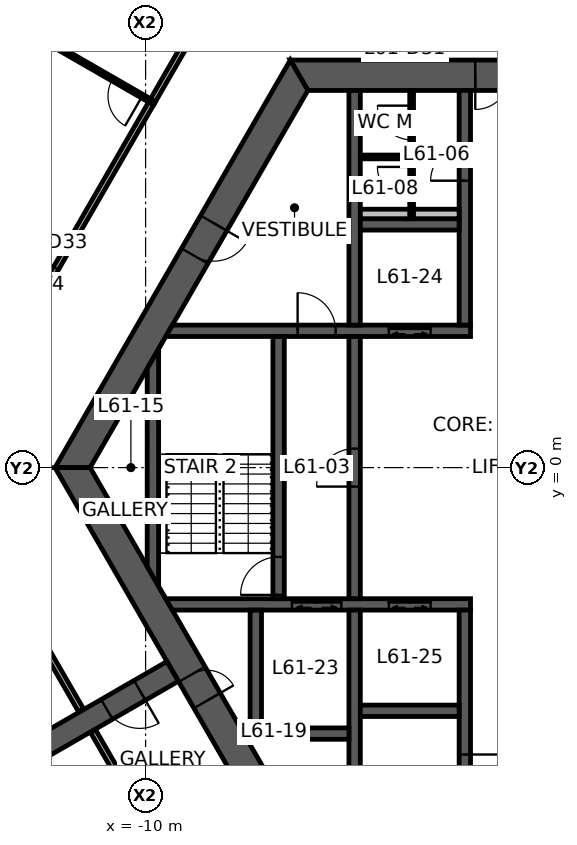
"""IFC4 building model, lengths in metres.
Left out: names, types, materials, properties, quantities, classifications, styles, units other than length and angle.
Written with IfcOpenShell. Run it as: python <this file> out.ifc"""

import sys

from ifc_helpers import new_model, si_unit, direction, frame, frame_2d, origin, place, context, subcontext, project, spatial, polyline, rectangle, outline, extrude, element, fill, save


model = new_model("IFC4")
c1 = context("Model", 3, precision=1e-05, world=origin(), true_north=direction((0.0, 1.0)))
c2 = subcontext(c1, "Body", "Model", "MODEL_VIEW")
j1 = project(units=[si_unit("LENGTHUNIT", "METRE"), si_unit("PLANEANGLEUNIT", "RADIAN")], contexts=[c1])
p1 = place(None, origin())
s1 = spatial("IfcSite", under=j1, at=p1, CompositionType="ELEMENT")
p2 = place(p1, origin())
s2 = spatial("IfcBuilding", under=s1, at=p2, CompositionType="ELEMENT")
p3 = place(p2, frame((0.0, 0.0, 244.0)))
s3 = spatial("IfcBuildingStorey", under=s2, at=p3, CompositionType="ELEMENT", Elevation=244.0)
p4 = place(p3, frame((5.961, 10.325, 0.0), z_axis=(0.0, 0.0, 1.0), x_axis=(-1.0, 0.0, 0.0)))
e1 = element("IfcWall", 1, at=p4, inside=s3, PredefinedType="SHEAR", context=c2, shape_type="SweptSolid", body=[
    extrude(outline(polyline([(-0.231, -0.4), (4.636, -0.4), (5.536, -0.4), (6.386, -0.4), (7.286, -0.4), (12.153, -0.4), (11.691, 0.4), (7.286, 0.4), (6.386, 0.4), (5.536, 0.4), (4.636, 0.4), (0.231, 0.4), (-0.231, -0.4)])), origin(), (0.0, 0.0, 1.0), 3.9),
])
p5 = place(p4, frame((6.386, 0.0, 0.0)))
e2 = element("IfcOpeningElement", 2, at=p5, cuts=e1, PredefinedType="OPENING", context=c2, shape_type="SweptSolid", body=[
    extrude(rectangle(XDim=0.9, YDim=2.1, at=frame_2d((0.45, 1.05))), frame((0.0, 0.41, 0.0), z_axis=(0.0, -1.0, 0.0), x_axis=(1.0, 0.0, 0.0)), (0.0, 0.0, 1.0), 0.82),
])
p6 = place(p4, frame((4.636, 0.0, 0.0)))
e3 = element("IfcOpeningElement", 3, at=p6, cuts=e1, PredefinedType="OPENING", context=c2, shape_type="SweptSolid", body=[
    extrude(rectangle(XDim=0.9, YDim=2.1, at=frame_2d((0.45, 1.05))), frame((0.0, 0.41, 0.0), z_axis=(0.0, -1.0, 0.0), x_axis=(1.0, 0.0, 0.0)), (0.0, 0.0, 1.0), 0.82),
])
p7 = place(p3, frame((-5.961, 10.325, 0.0), z_axis=(0.0, 0.0, 1.0), x_axis=(-0.500004296715, -0.866022923061, 0.0)))
e4 = element("IfcWall", 4, at=p7, inside=s3, PredefinedType="SHEAR", context=c2, shape_type="SweptSolid", body=[
    extrude(outline(polyline([(-0.231, -0.4), (4.494, -0.4), (5.494, -0.4), (12.153, -0.4), (11.691, 0.4), (5.494, 0.4), (4.494, 0.4), (0.231, 0.4), (-0.231, -0.4)])), origin(), (0.0, 0.0, 1.0), 3.9),
])
p8 = place(p7, frame((4.494, 0.0, 0.0)))
e5 = element("IfcOpeningElement", 5, at=p8, cuts=e4, PredefinedType="OPENING", context=c2, shape_type="SweptSolid", body=[
    extrude(rectangle(XDim=1.0, YDim=2.1, at=frame_2d((0.5, 1.05))), frame((0.0, 0.41, 0.0), z_axis=(0.0, -1.0, 0.0), x_axis=(1.0, 0.0, 0.0)), (0.0, 0.0, 1.0), 0.82),
])
p9 = place(p3, frame((-11.922, 0.0, 0.0), z_axis=(0.0, 0.0, 1.0), x_axis=(0.500004296715, -0.866022923061, 0.0)))
e6 = element("IfcWall", 6, at=p9, inside=s3, PredefinedType="SHEAR", context=c2, shape_type="SweptSolid", body=[
    extrude(outline(polyline([(-0.231, -0.4), (6.281, -0.4), (7.081, -0.4), (12.153, -0.4), (11.691, 0.4), (7.081, 0.4), (6.281, 0.4), (0.231, 0.4), (-0.231, -0.4)])), origin(), (0.0, 0.0, 1.0), 3.9),
])
p10 = place(p9, frame((6.281, 0.0, 0.0)))
e7 = element("IfcOpeningElement", 7, at=p10, cuts=e6, PredefinedType="OPENING", context=c2, shape_type="SweptSolid", body=[
    extrude(rectangle(XDim=0.8, YDim=2.1, at=frame_2d((0.4, 1.05))), frame((0.0, 0.41, 0.0), z_axis=(0.0, -1.0, 0.0), x_axis=(1.0, 0.0, 0.0)), (0.0, 0.0, 1.0), 0.82),
])
p11 = place(p3, frame((-9.288, -5.363, 0.0), z_axis=(0.0, 0.0, 1.0), x_axis=(-0.866027473358, -0.499996415376, 0.0)))
e8 = element("IfcWall", 8, at=p11, inside=s3, PredefinedType="SHEAR", context=c2, shape_type="SweptSolid", body=[
    extrude(rectangle(XDim=7.045, YDim=0.6, at=frame_2d((3.523, 0.0))), origin(), (0.0, 0.0, 1.0), 3.9),
])
p12 = place(p11, frame((1.0, 0.0, 0.0)))
e9 = element("IfcOpeningElement", 9, at=p12, cuts=e8, PredefinedType="OPENING", context=c2, shape_type="SweptSolid", body=[
    extrude(rectangle(XDim=1.0, YDim=2.1, at=frame_2d((0.5, 1.05))), frame((0.0, 0.31, 0.0), z_axis=(0.0, -1.0, 0.0), x_axis=(1.0, 0.0, 0.0)), (0.0, 0.0, 1.0), 0.62),
])
p13 = place(p3, frame((-9.382, 3.6, 0.0), z_axis=(0.0, 0.0, 1.0), x_axis=(1.0, 0.0, 0.0)))
e10 = element("IfcWall", 10, at=p13, inside=s3, PredefinedType="SHEAR", context=c2, shape_type="SweptSolid", body=[
    extrude(outline(polyline([(-0.087, -0.15), (3.382, -0.15), (4.382, -0.15), (5.782, -0.15), (6.882, -0.15), (7.932, -0.15), (7.932, 0.15), (6.882, 0.15), (5.782, 0.15), (4.382, 0.15), (3.382, 0.15), (0.087, 0.15), (-0.087, -0.15)])), origin(), (0.0, 0.0, 1.0), 3.9),
])
p14 = place(p13, frame((3.382, 0.0, 0.0)))
e11 = element("IfcOpeningElement", 11, at=p14, cuts=e10, PredefinedType="OPENING", context=c2, shape_type="SweptSolid", body=[
    extrude(rectangle(XDim=1.0, YDim=2.1, at=frame_2d((0.5, 1.05))), frame((0.0, 0.16, 0.0), z_axis=(0.0, -1.0, 0.0), x_axis=(1.0, 0.0, 0.0)), (0.0, 0.0, 1.0), 0.32),
])
p15 = place(p13, frame((5.782, 0.0, 0.0)))
e12 = element("IfcOpeningElement", 12, at=p15, cuts=e10, PredefinedType="OPENING", context=c2, shape_type="SweptSolid", body=[
    extrude(rectangle(XDim=1.1, YDim=2.1, at=frame_2d((0.55, 1.05))), frame((0.0, 0.16, 0.0), z_axis=(0.0, -1.0, 0.0), x_axis=(1.0, 0.0, 0.0)), (0.0, 0.0, 1.0), 0.32),
])
p16 = place(p3, frame((-9.382, -3.6, 0.0), z_axis=(0.0, 0.0, 1.0), x_axis=(1.0, 0.0, 0.0)))
e13 = element("IfcWall", 13, at=p16, inside=s3, PredefinedType="SHEAR", context=c2, shape_type="SweptSolid", body=[
    extrude(outline(polyline([(0.087, -0.15), (3.232, -0.15), (4.532, -0.15), (5.782, -0.15), (6.882, -0.15), (7.932, -0.15), (7.932, 0.15), (6.882, 0.15), (5.782, 0.15), (4.532, 0.15), (3.232, 0.15), (-0.087, 0.15), (0.087, -0.15)])), origin(), (0.0, 0.0, 1.0), 3.9),
])
p17 = place(p16, frame((5.782, 0.0, 0.0)))
e14 = element("IfcOpeningElement", 14, at=p17, cuts=e13, PredefinedType="OPENING", context=c2, shape_type="SweptSolid", body=[
    extrude(rectangle(XDim=1.1, YDim=2.1, at=frame_2d((0.55, 1.05))), frame((0.0, 0.16, 0.0), z_axis=(0.0, -1.0, 0.0), x_axis=(1.0, 0.0, 0.0)), (0.0, 0.0, 1.0), 0.32),
])
p18 = place(p16, frame((3.232, 0.0, 0.0)))
e15 = element("IfcOpeningElement", 15, at=p18, cuts=e13, PredefinedType="OPENING", context=c2, shape_type="SweptSolid", body=[
    extrude(rectangle(XDim=1.3, YDim=2.1, at=frame_2d((0.65, 1.05))), frame((0.0, 0.16, 0.0), z_axis=(0.0, -1.0, 0.0), x_axis=(1.0, 0.0, 0.0)), (0.0, 0.0, 1.0), 0.32),
])
p19 = place(p3, frame((-1.6, 3.75, 0.0), z_axis=(0.0, 0.0, 1.0), x_axis=(0.0, 1.0, 0.0)))
e16 = element("IfcWall", 16, at=p19, inside=s3, PredefinedType="SHEAR", context=c2, shape_type="SweptSolid", body=[
    extrude(rectangle(XDim=6.175, YDim=0.3, at=frame_2d((3.087, 0.0))), origin(), (0.0, 0.0, 1.0), 3.9),
])
p20 = place(p19, frame((3.8, 0.0, 0.0)))
e17 = element("IfcOpeningElement", 17, at=p20, cuts=e16, PredefinedType="OPENING", context=c2, shape_type="SweptSolid", body=[
    extrude(rectangle(XDim=0.9, YDim=2.1, at=frame_2d((0.45, 1.05))), frame((0.0, 0.16, 0.0), z_axis=(0.0, -1.0, 0.0), x_axis=(1.0, 0.0, 0.0)), (0.0, 0.0, 1.0), 0.32),
])
p21 = place(p3, frame((-1.6, -3.75, 0.0), z_axis=(0.0, 0.0, 1.0), x_axis=(0.0, -1.0, 0.0)))
e18 = element("IfcWall", 18, at=p21, inside=s3, PredefinedType="SHEAR", context=c2, shape_type="SweptSolid", body=[
    extrude(rectangle(XDim=6.175, YDim=0.3, at=frame_2d((3.087, 0.0))), origin(), (0.0, 0.0, 1.0), 3.9),
])
p22 = place(p21, frame((3.8, 0.0, 0.0)))
e19 = element("IfcOpeningElement", 19, at=p22, cuts=e18, PredefinedType="OPENING", context=c2, shape_type="SweptSolid", body=[
    extrude(rectangle(XDim=0.9, YDim=2.1, at=frame_2d((0.45, 1.05))), frame((0.0, 0.16, 0.0), z_axis=(0.0, -1.0, 0.0), x_axis=(1.0, 0.0, 0.0)), (0.0, 0.0, 1.0), 0.32),
])
p23 = place(p3, frame((-4.5, -3.45, 0.0), z_axis=(0.0, 0.0, 1.0), x_axis=(0.0, 1.0, 0.0)))
e20 = element("IfcWall", 20, at=p23, inside=s3, PredefinedType="SHEAR", context=c2, shape_type="SweptSolid", body=[
    extrude(rectangle(XDim=6.9, YDim=0.3, at=frame_2d((3.45, 0.0))), origin(), (0.0, 0.0, 1.0), 3.9),
])
p24 = place(p23, frame((2.95, 0.0, 0.0)))
e21 = element("IfcOpeningElement", 21, at=p24, cuts=e20, PredefinedType="OPENING", context=c2, shape_type="SweptSolid", body=[
    extrude(rectangle(XDim=1.0, YDim=2.1, at=frame_2d((0.5, 1.05))), frame((0.0, 0.16, 0.0), z_axis=(0.0, -1.0, 0.0), x_axis=(1.0, 0.0, 0.0)), (0.0, 0.0, 1.0), 0.32),
])
p25 = place(p3, frame((-6.5, -3.45, 0.0), z_axis=(0.0, 0.0, 1.0), x_axis=(0.0, 1.0, 0.0)))
e22 = element("IfcWall", 22, at=p25, inside=s3, PredefinedType="SHEAR", context=c2, shape_type="SweptSolid", body=[
    extrude(rectangle(XDim=6.9, YDim=0.3, at=frame_2d((3.45, 0.0))), origin(), (0.0, 0.0, 1.0), 3.9),
])
p26 = place(p25, frame((0.1, 0.0, 0.0)))
e23 = element("IfcOpeningElement", 23, at=p26, cuts=e22, PredefinedType="OPENING", context=c2, shape_type="SweptSolid", body=[
    extrude(rectangle(XDim=1.0, YDim=2.1, at=frame_2d((0.5, 1.05))), frame((0.0, 0.16, 0.0), z_axis=(0.0, -1.0, 0.0), x_axis=(1.0, 0.0, 0.0)), (0.0, 0.0, 1.0), 0.32),
])
for number, where, z_axis, x_axis in (
    (24, (-4.5, 3.75, 0.0), (0.0, 0.0, 1.0), (0.0, 1.0, 0.0)),
    (25, (-4.5, -3.75, 0.0), (0.0, 0.0, 1.0), (0.0, -1.0, 0.0)),
):
    element("IfcWall", number, at=place(p3, frame(where, z_axis=z_axis, x_axis=x_axis)), inside=s3, PredefinedType="SHEAR", context=c2, shape_type="SweptSolid", body=[
        extrude(rectangle(XDim=6.175, YDim=0.3, at=frame_2d((3.087, 0.0))), origin(), (0.0, 0.0, 1.0), 3.9),
    ])
for number, where, z_axis, x_axis in (
    (26, (-4.35, 6.4, 0.0), (0.0, 0.0, 1.0), (1.0, 0.0, 0.0)),
    (27, (-4.35, -6.4, 0.0), (0.0, 0.0, 1.0), (1.0, 0.0, 0.0)),
    (28, (-7.25, -7.0, 0.0), (0.0, 0.0, 1.0), (1.0, 0.0, 0.0)),
):
    element("IfcWall", number, at=place(p3, frame(where, z_axis=z_axis, x_axis=x_axis)), inside=s3, PredefinedType="SHEAR", context=c2, shape_type="SweptSolid", body=[
        extrude(rectangle(XDim=2.6, YDim=0.3, at=frame_2d((1.3, 0.0))), origin(), (0.0, 0.0, 1.0), 3.9),
    ])
p27 = place(p3, frame((-7.1, -3.75, 0.0), z_axis=(0.0, 0.0, 1.0), x_axis=(0.0, -1.0, 0.0)))
e29 = element("IfcWall", 29, at=p27, inside=s3, PredefinedType="SHEAR", context=c2, shape_type="SweptSolid", body=[
    extrude(rectangle(XDim=3.1, YDim=0.3, at=frame_2d((1.55, 0.0))), origin(), (0.0, 0.0, 1.0), 3.9),
])
p28 = place(p3, frame((-9.808, -2.862, 0.0), z_axis=(0.0, 0.0, 1.0), x_axis=(0.0, 1.0, 0.0)))
e30 = element("IfcWall", 30, at=p28, inside=s3, PredefinedType="SHEAR", context=c2, shape_type="SweptSolid", body=[
    extrude(outline(polyline([(-0.26, -0.15), (5.984, -0.15), (5.465, 0.15), (0.26, 0.15), (-0.26, -0.15)])), origin(), (0.0, 0.0, 1.0), 3.9),
])
p29 = place(p3, frame((-4.35, 6.675, 0.0), z_axis=(0.0, 0.0, 1.0), x_axis=(1.0, 0.0, 0.0)))
e31 = element("IfcWall", 31, at=p29, inside=s3, PredefinedType="PLUMBINGWALL", context=c2, shape_type="SweptSolid", body=[
    extrude(rectangle(XDim=2.6, YDim=0.25, at=frame_2d((1.3, 0.0))), origin(), (0.0, 0.0, 1.0), 3.9),
])
p30 = place(p3, frame((-3.0, 6.55, 0.0), z_axis=(0.0, 0.0, 1.0), x_axis=(0.0, 1.0, 0.0)))
e32 = element("IfcWall", 32, at=p30, inside=s3, PredefinedType="PARTITIONING", context=c2, shape_type="SweptSolid", body=[
    extrude(rectangle(XDim=3.375, YDim=0.1, at=frame_2d((1.688, 0.0))), origin(), (0.0, 0.0, 1.0), 2.95),
])
p31 = place(p30, frame((2.075, 0.0, 0.0)))
e33 = element("IfcOpeningElement", 33, at=p31, cuts=e32, PredefinedType="OPENING", context=c2, shape_type="SweptSolid", body=[
    extrude(rectangle(XDim=0.9, YDim=2.1, at=frame_2d((0.45, 1.05))), frame((0.0, 0.06, 0.0), z_axis=(0.0, -1.0, 0.0), x_axis=(1.0, 0.0, 0.0)), (0.0, 0.0, 1.0), 0.12),
])
p32 = place(p30, frame((0.462, 0.0, 0.0)))
e34 = element("IfcOpeningElement", 34, at=p32, cuts=e32, PredefinedType="OPENING", context=c2, shape_type="SweptSolid", body=[
    extrude(rectangle(XDim=0.9, YDim=2.1, at=frame_2d((0.45, 1.05))), frame((0.0, 0.06, 0.0), z_axis=(0.0, -1.0, 0.0), x_axis=(1.0, 0.0, 0.0)), (0.0, 0.0, 1.0), 0.12),
])
p33 = place(p3, frame((-3.05, 8.175, 0.0), z_axis=(0.0, 0.0, 1.0), x_axis=(-1.0, 0.0, 0.0)))
e35 = element("IfcWall", 35, at=p33, inside=s3, PredefinedType="PARTITIONING", context=c2, shape_type="SweptSolid", body=[
    extrude(rectangle(XDim=1.3, YDim=0.1, at=frame_2d((0.65, 0.0))), origin(), (0.0, 0.0, 1.0), 2.95),
])
p34 = place(p3, frame((-11.7, -6.385, 0.0), z_axis=(0.0, 0.0, 1.0), x_axis=(-0.500003537243, 0.866023361547, 0.0)))
e36 = element("IfcWall", 36, at=p34, inside=s3, PredefinedType="PARTITIONING", context=c2, shape_type="SweptSolid", body=[
    extrude(rectangle(XDim=6.516, YDim=0.15, at=frame_2d((3.258, 0.0))), origin(), (0.0, 0.0, 1.0), 2.95),
])
p35 = place(p3, frame((-9.835, 9.616, 0.0), z_axis=(0.0, 0.0, 1.0), x_axis=(0.500078009402, 0.86598036035, 0.0)))
e37 = element("IfcWall", 37, at=p35, inside=s3, PredefinedType="PARTITIONING", context=c2, shape_type="SweptSolid", body=[
    extrude(rectangle(XDim=4.26, YDim=0.15, at=frame_2d((2.13, 0.0))), origin(), (0.0, 0.0, 1.0), 2.95),
])
p36 = place(p3, frame((-15.386, 0.0, 0.0), z_axis=(0.0, 0.0, 1.0), x_axis=(0.50000453164, 0.866022787425, 0.0)))
e38 = element("IfcWall", 38, at=p36, inside=s3, PredefinedType="PARTITIONING", context=c2, shape_type="SweptSolid", body=[
    extrude(rectangle(XDim=11.113, YDim=0.15, at=frame_2d((5.557, 0.0))), origin(), (0.0, 0.0, 1.0), 2.95),
])
p37 = place(p36, frame((5.057, 0.0, 0.0)))
e39 = element("IfcOpeningElement", 39, at=p37, cuts=e38, PredefinedType="OPENING", context=c2, shape_type="SweptSolid", body=[
    extrude(rectangle(XDim=1.0, YDim=2.1, at=frame_2d((0.5, 1.05))), frame((0.0, 0.085, 0.0), z_axis=(0.0, -1.0, 0.0), x_axis=(1.0, 0.0, 0.0)), (0.0, 0.0, 1.0), 0.17),
])
p38 = place(p3, frame((-9.83, 9.624, 0.0), z_axis=(0.0, 0.0, 1.0), x_axis=(-0.866527293697, 0.499129691842, 0.0)))
e40 = element("IfcWall", 40, at=p38, inside=s3, PredefinedType="PARTITIONING", context=c2, shape_type="SweptSolid", body=[
    extrude(rectangle(XDim=4.505, YDim=0.1, at=frame_2d((2.253, 0.0))), origin(), (0.0, 0.0, 1.0), 2.95),
])
p39 = place(p38, frame((0.3, 0.0, 0.0)))
e41 = element("IfcOpeningElement", 41, at=p39, cuts=e40, PredefinedType="OPENING", context=c2, shape_type="SweptSolid", body=[
    extrude(rectangle(XDim=0.9, YDim=2.1, at=frame_2d((0.45, 1.05))), frame((0.0, 0.06, 0.0), z_axis=(0.0, -1.0, 0.0), x_axis=(1.0, 0.0, 0.0)), (0.0, 0.0, 1.0), 0.12),
])
p40 = place(p3, frame((-10.738, -8.052, 0.0), z_axis=(0.0, 0.0, 1.0), x_axis=(-0.500084415177, 0.865976661173, 0.0)))
e42 = element("IfcWall", 42, at=p40, inside=s3, PredefinedType="PARTITIONING", context=c2, shape_type="SweptSolid", body=[
    extrude(rectangle(XDim=1.284, YDim=0.15, at=frame_2d((0.642, 0.0))), origin(), (0.0, 0.0, 1.0), 2.95),
])
p41 = place(p5, origin())
e43 = element("IfcDoor", 43, at=p41, inside=s3, OperationType="SINGLE_SWING_RIGHT", PredefinedType="DOOR", context=c2, shape_type="SweptSolid", body=[
    extrude(rectangle(XDim=0.9, YDim=2.1, at=frame_2d((0.45, 1.05))), frame((0.0, 0.025, 0.0), z_axis=(0.0, -1.0, 0.0), x_axis=(1.0, 0.0, 0.0)), (0.0, 0.0, 1.0), 0.05),
])
fill(e2, e43)
p42 = place(p10, origin())
e44 = element("IfcDoor", 44, at=p42, inside=s3, OperationType="SINGLE_SWING_RIGHT", PredefinedType="DOOR", context=c2, shape_type="SweptSolid", body=[
    extrude(rectangle(XDim=0.8, YDim=2.1, at=frame_2d((0.4, 1.05))), frame((0.0, 0.025, 0.0), z_axis=(0.0, -1.0, 0.0), x_axis=(1.0, 0.0, 0.0)), (0.0, 0.0, 1.0), 0.05),
])
fill(e7, e44)
p43 = place(p8, origin())
e45 = element("IfcDoor", 45, at=p43, inside=s3, OperationType="SINGLE_SWING_LEFT", PredefinedType="DOOR", context=c2, shape_type="SweptSolid", body=[
    extrude(rectangle(XDim=1.0, YDim=2.1, at=frame_2d((0.5, 1.05))), frame((0.0, 0.025, 0.0), z_axis=(0.0, -1.0, 0.0), x_axis=(1.0, 0.0, 0.0)), (0.0, 0.0, 1.0), 0.05),
])
fill(e5, e45)
p44 = place(p24, origin())
e46 = element("IfcDoor", 46, at=p44, inside=s3, OperationType="SINGLE_SWING_LEFT", PredefinedType="DOOR", context=c2, shape_type="SweptSolid", body=[
    extrude(rectangle(XDim=1.0, YDim=2.1, at=frame_2d((0.5, 1.05))), frame((0.0, 0.025, 0.0), z_axis=(0.0, -1.0, 0.0), x_axis=(1.0, 0.0, 0.0)), (0.0, 0.0, 1.0), 0.05),
])
fill(e21, e46)
p45 = place(p26, origin())
e47 = element("IfcDoor", 47, at=p45, inside=s3, OperationType="SINGLE_SWING_LEFT", PredefinedType="DOOR", context=c2, shape_type="SweptSolid", body=[
    extrude(rectangle(XDim=1.0, YDim=2.1, at=frame_2d((0.5, 1.05))), frame((0.0, 0.025, 0.0), z_axis=(0.0, -1.0, 0.0), x_axis=(1.0, 0.0, 0.0)), (0.0, 0.0, 1.0), 0.05),
])
fill(e23, e47)
p46 = place(p14, origin())
e48 = element("IfcDoor", 48, at=p46, inside=s3, OperationType="SINGLE_SWING_LEFT", PredefinedType="DOOR", context=c2, shape_type="SweptSolid", body=[
    extrude(rectangle(XDim=1.0, YDim=2.1, at=frame_2d((0.5, 1.05))), frame((0.0, 0.025, 0.0), z_axis=(0.0, -1.0, 0.0), x_axis=(1.0, 0.0, 0.0)), (0.0, 0.0, 1.0), 0.05),
])
fill(e11, e48)
p47 = place(p20, origin())
e49 = element("IfcDoor", 49, at=p47, inside=s3, OperationType="SINGLE_SWING_LEFT", PredefinedType="DOOR", context=c2, shape_type="SweptSolid", body=[
    extrude(rectangle(XDim=0.9, YDim=2.1, at=frame_2d((0.45, 1.05))), frame((0.0, 0.025, 0.0), z_axis=(0.0, -1.0, 0.0), x_axis=(1.0, 0.0, 0.0)), (0.0, 0.0, 1.0), 0.05),
])
fill(e17, e49)
p48 = place(p22, origin())
e50 = element("IfcDoor", 50, at=p48, inside=s3, OperationType="SINGLE_SWING_LEFT", PredefinedType="DOOR", context=c2, shape_type="SweptSolid", body=[
    extrude(rectangle(XDim=0.9, YDim=2.1, at=frame_2d((0.45, 1.05))), frame((0.0, 0.025, 0.0), z_axis=(0.0, -1.0, 0.0), x_axis=(1.0, 0.0, 0.0)), (0.0, 0.0, 1.0), 0.05),
])
fill(e19, e50)
p49 = place(p12, origin())
e51 = element("IfcDoor", 51, at=p49, inside=s3, OperationType="SINGLE_SWING_LEFT", PredefinedType="DOOR", context=c2, shape_type="SweptSolid", body=[
    extrude(rectangle(XDim=1.0, YDim=2.1, at=frame_2d((0.5, 1.05))), frame((0.0, 0.025, 0.0), z_axis=(0.0, -1.0, 0.0), x_axis=(1.0, 0.0, 0.0)), (0.0, 0.0, 1.0), 0.05),
])
fill(e9, e51)
p50 = place(p31, origin())
e52 = element("IfcDoor", 52, at=p50, inside=s3, OperationType="SINGLE_SWING_RIGHT", PredefinedType="DOOR", context=c2, shape_type="SweptSolid", body=[
    extrude(rectangle(XDim=0.9, YDim=2.1, at=frame_2d((0.45, 1.05))), frame((0.0, 0.025, 0.0), z_axis=(0.0, -1.0, 0.0), x_axis=(1.0, 0.0, 0.0)), (0.0, 0.0, 1.0), 0.05),
])
fill(e33, e52)
p51 = place(p32, origin())
e53 = element("IfcDoor", 53, at=p51, inside=s3, OperationType="SINGLE_SWING_RIGHT", PredefinedType="DOOR", context=c2, shape_type="SweptSolid", body=[
    extrude(rectangle(XDim=0.9, YDim=2.1, at=frame_2d((0.45, 1.05))), frame((0.0, 0.025, 0.0), z_axis=(0.0, -1.0, 0.0), x_axis=(1.0, 0.0, 0.0)), (0.0, 0.0, 1.0), 0.05),
])
fill(e34, e53)
p52 = place(p37, origin())
e54 = element("IfcDoor", 54, at=p52, inside=s3, OperationType="SINGLE_SWING_LEFT", PredefinedType="DOOR", context=c2, shape_type="SweptSolid", body=[
    extrude(rectangle(XDim=1.0, YDim=2.1, at=frame_2d((0.5, 1.05))), frame((0.0, 0.025, 0.0), z_axis=(0.0, -1.0, 0.0), x_axis=(1.0, 0.0, 0.0)), (0.0, 0.0, 1.0), 0.05),
])
fill(e39, e54)
p53 = place(p39, origin())
e55 = element("IfcDoor", 55, at=p53, inside=s3, OperationType="SINGLE_SWING_LEFT", PredefinedType="DOOR", context=c2, shape_type="SweptSolid", body=[
    extrude(rectangle(XDim=0.9, YDim=2.1, at=frame_2d((0.45, 1.05))), frame((0.0, 0.025, 0.0), z_axis=(0.0, -1.0, 0.0), x_axis=(1.0, 0.0, 0.0)), (0.0, 0.0, 1.0), 0.05),
])
fill(e41, e55)
p54 = place(p15, origin())
e56 = element("IfcDoor", 56, at=p54, inside=s3, OperationType="DOUBLE_DOOR_SLIDING", PredefinedType="DOOR", context=c2, shape_type="SweptSolid", body=[
    extrude(rectangle(XDim=1.1, YDim=2.1, at=frame_2d((0.55, 1.05))), frame((0.0, 0.025, 0.0), z_axis=(0.0, -1.0, 0.0), x_axis=(1.0, 0.0, 0.0)), (0.0, 0.0, 1.0), 0.05),
])
fill(e12, e56)
p55 = place(p17, origin())
e57 = element("IfcDoor", 57, at=p55, inside=s3, OperationType="DOUBLE_DOOR_SLIDING", PredefinedType="DOOR", context=c2, shape_type="SweptSolid", body=[
    extrude(rectangle(XDim=1.1, YDim=2.1, at=frame_2d((0.55, 1.05))), frame((0.0, 0.025, 0.0), z_axis=(0.0, -1.0, 0.0), x_axis=(1.0, 0.0, 0.0)), (0.0, 0.0, 1.0), 0.05),
])
fill(e14, e57)
p56 = place(p18, origin())
e58 = element("IfcDoor", 58, at=p56, inside=s3, OperationType="DOUBLE_DOOR_SLIDING", PredefinedType="DOOR", context=c2, shape_type="SweptSolid", body=[
    extrude(rectangle(XDim=1.3, YDim=2.1, at=frame_2d((0.65, 1.05))), frame((0.0, 0.025, 0.0), z_axis=(0.0, -1.0, 0.0), x_axis=(1.0, 0.0, 0.0)), (0.0, 0.0, 1.0), 0.05),
])
fill(e15, e58)
save(model, sys.argv[1])
